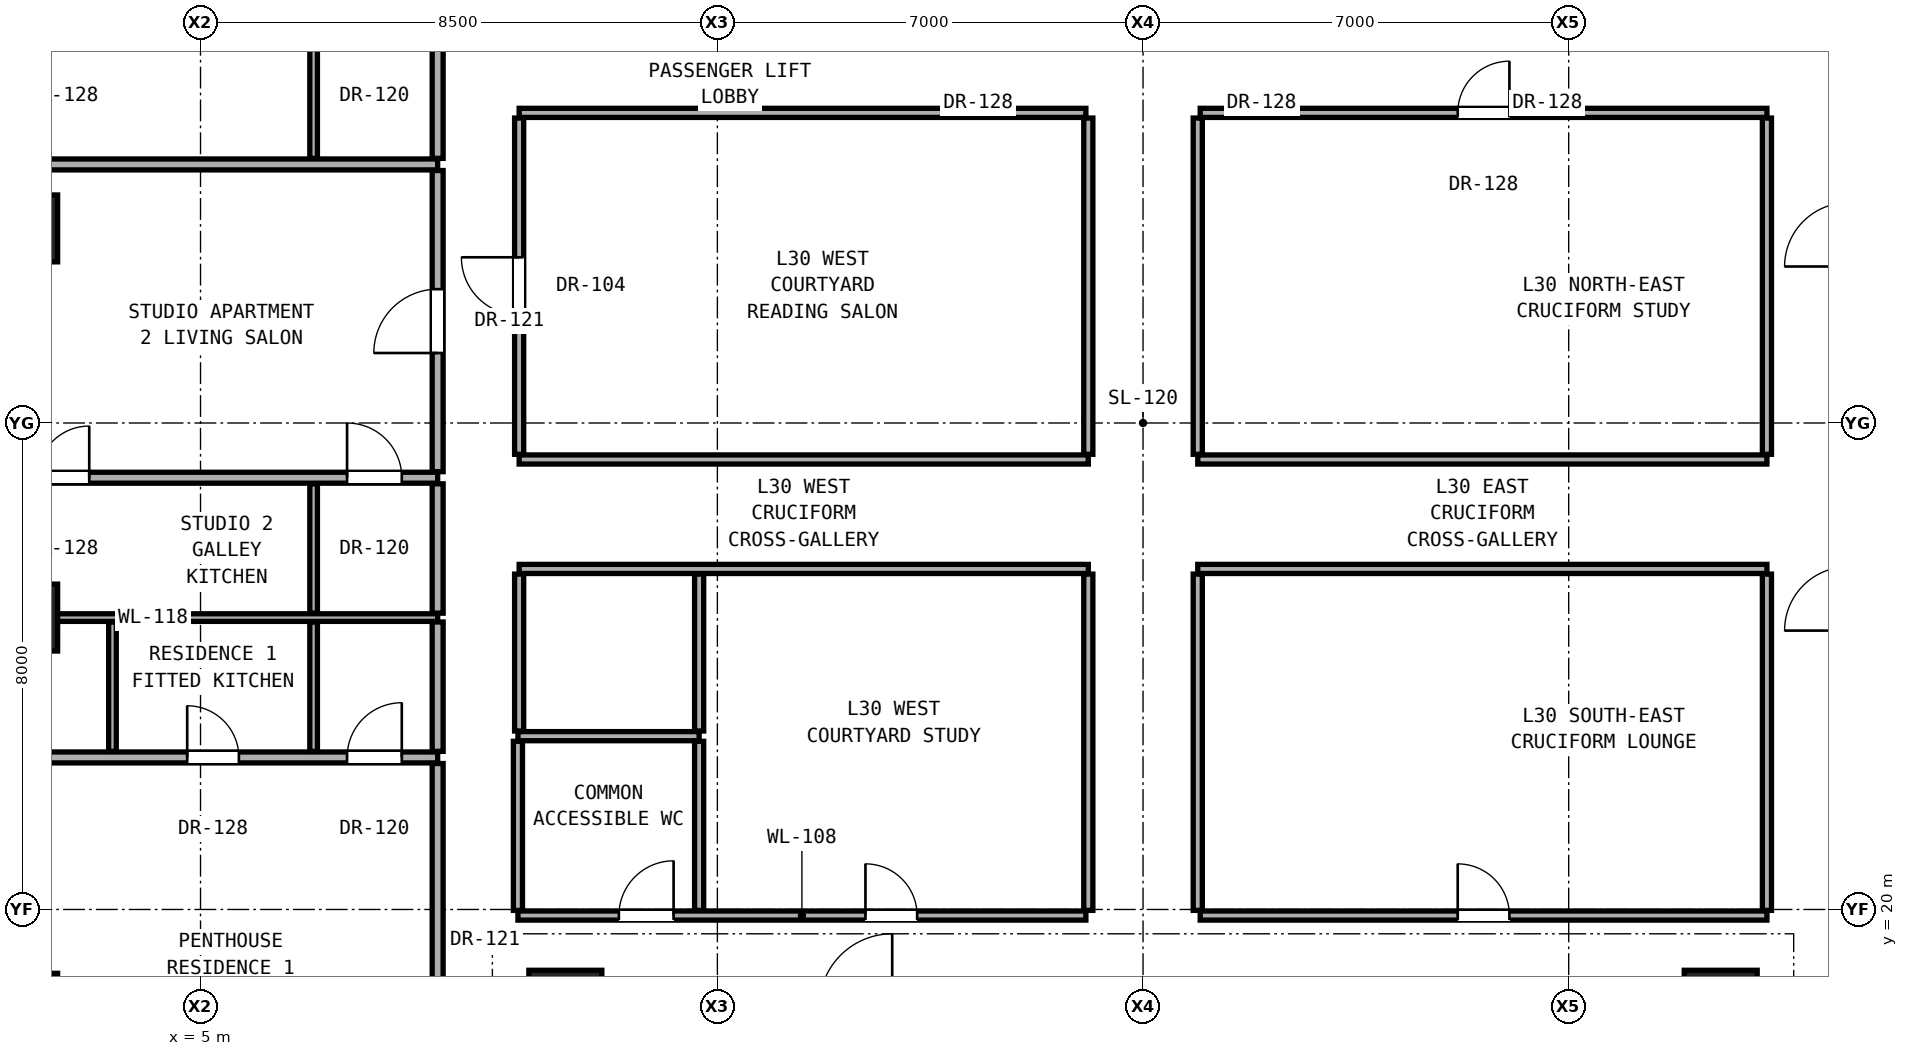
"""IFC4 building model, lengths in metres.
Left out: names, types, materials, properties, quantities, classifications, styles, units other than length and angle.
Written with IfcOpenShell. Run it as: python <this file> out.ifc"""

import sys

from ifc_helpers import new_model, si_unit, direction, frame, frame_2d, origin, origin_2d, place, context, subcontext, project, spatial, rectangle, hollow_rectangle, extrude, element, fill, save


model = new_model("IFC4")
c1 = context("Model", 3, precision=1e-05, world=origin(), true_north=direction((0.0, 1.0)))
c2 = subcontext(c1, "Body", "Model", "MODEL_VIEW")
j1 = project(units=[si_unit("LENGTHUNIT", "METRE"), si_unit("PLANEANGLEUNIT", "RADIAN")], contexts=[c1])
p1 = place(None, origin())
s1 = spatial("IfcSite", under=j1, at=p1, CompositionType="ELEMENT")
p2 = place(p1, origin())
s2 = spatial("IfcBuilding", under=s1, at=p2, CompositionType="ELEMENT")
p3 = place(p2, frame((0.0, 0.0, 108.2)))
s3 = spatial("IfcBuildingStorey", under=s2, at=p3, CompositionType="ELEMENT", Elevation=108.2)
for number, where, z_axis, x_axis in (
    (1, (11.0, 18.4, 0.0), (0.0, 0.0, 1.0), (1.0, 0.0, 0.0)),
    (2, (30.0, 18.4, 0.0), (0.0, 0.0, 1.0), (1.0, 0.0, 0.0)),
):
    element("IfcColumn", number, at=place(p3, frame(where, z_axis=z_axis, x_axis=x_axis)), inside=s3, PredefinedType="COLUMN", context=c2, shape_type="SweptSolid", body=[
        extrude(rectangle(XDim=1.2, YDim=1.2, at=origin_2d()), origin(), (0.0, 0.0, 1.0), 3.3),
    ])
for number, where, z_axis, x_axis in (
    (3, (2.1, 18.4, 0.0), (0.0, 0.0, 1.0), (1.0, 0.0, 0.0)),
    (4, (2.1, 24.8, 0.0), (0.0, 0.0, 1.0), (1.0, 0.0, 0.0)),
    (5, (2.1, 31.2, 0.0), (0.0, 0.0, 1.0), (1.0, 0.0, 0.0)),
):
    element("IfcColumn", number, at=place(p3, frame(where, z_axis=z_axis, x_axis=x_axis)), inside=s3, PredefinedType="COLUMN", context=c2, shape_type="SweptSolid", body=[
        extrude(hollow_rectangle(XDim=1.1, YDim=1.1, WallThickness=0.06, at=origin_2d()), origin(), (0.0, 0.0, 1.0), 3.3),
    ])
p4 = place(p3, frame((10.22, 19.9, 0.0), z_axis=(0.0, 0.0, 1.0), x_axis=(1.0, 0.0, 0.0)))
e6 = element("IfcWall", 6, at=p4, inside=s3, PredefinedType="PARTITIONING", context=c2, shape_type="SweptSolid", body=[
    extrude(rectangle(XDim=9.34, YDim=0.15, at=frame_2d((4.67, 0.0))), origin(), (0.0, 0.0, 1.0), 2.124),
])
p5 = place(p4, frame((1.66, 0.0, 0.0)))
e7 = element("IfcOpeningElement", 7, at=p5, cuts=e6, PredefinedType="OPENING", context=c2, shape_type="SweptSolid", body=[
    extrude(rectangle(XDim=0.9, YDim=2.1, at=frame_2d((0.45, 1.05))), frame((0.0, 0.085, 0.0), z_axis=(0.0, -1.0, 0.0), x_axis=(1.0, 0.0, 0.0)), (0.0, 0.0, 1.0), 0.17),
])
p6 = place(p4, frame((5.715, 0.0, 0.0)))
e8 = element("IfcOpeningElement", 8, at=p6, cuts=e6, PredefinedType="OPENING", context=c2, shape_type="SweptSolid", body=[
    extrude(rectangle(XDim=0.85, YDim=2.01, at=frame_2d((0.425, 1.005))), frame((0.0, 0.085, 0.0), z_axis=(0.0, -1.0, 0.0), x_axis=(1.0, 0.0, 0.0)), (0.0, 0.0, 1.0), 0.17),
])
p7 = place(p3, frame((21.44, 19.9, 0.0), z_axis=(0.0, 0.0, 1.0), x_axis=(1.0, 0.0, 0.0)))
e9 = element("IfcWall", 9, at=p7, inside=s3, PredefinedType="PARTITIONING", context=c2, shape_type="SweptSolid", body=[
    extrude(rectangle(XDim=9.32, YDim=0.15, at=frame_2d((4.66, 0.0))), origin(), (0.0, 0.0, 1.0), 2.124),
])
p8 = place(p7, frame((4.235, 0.0, 0.0)))
e10 = element("IfcOpeningElement", 10, at=p8, cuts=e9, PredefinedType="OPENING", context=c2, shape_type="SweptSolid", body=[
    extrude(rectangle(XDim=0.85, YDim=2.01, at=frame_2d((0.425, 1.005))), frame((0.0, 0.085, 0.0), z_axis=(0.0, -1.0, 0.0), x_axis=(1.0, 0.0, 0.0)), (0.0, 0.0, 1.0), 0.17),
])
p9 = place(p3, frame((-1.41, 22.5, 0.0), z_axis=(0.0, 0.0, 1.0), x_axis=(1.0, 0.0, 0.0)))
e11 = element("IfcWall", 11, at=p9, inside=s3, PredefinedType="PARTITIONING", context=c2, shape_type="SweptSolid", body=[
    extrude(rectangle(XDim=10.31, YDim=0.18, at=frame_2d((5.155, 0.0))), origin(), (0.0, 0.0, 1.0), 2.145),
])
p10 = place(p9, frame((2.076, 0.0, 0.0)))
e12 = element("IfcOpeningElement", 12, at=p10, cuts=e11, PredefinedType="OPENING", context=c2, shape_type="SweptSolid", body=[
    extrude(rectangle(XDim=0.85, YDim=2.01, at=frame_2d((0.425, 1.005))), frame((0.0, 0.1, 0.0), z_axis=(0.0, -1.0, 0.0), x_axis=(1.0, 0.0, 0.0)), (0.0, 0.0, 1.0), 0.2),
])
p11 = place(p9, frame((6.191, 0.0, 0.0)))
e13 = element("IfcOpeningElement", 13, at=p11, cuts=e11, PredefinedType="OPENING", context=c2, shape_type="SweptSolid", body=[
    extrude(rectangle(XDim=0.85, YDim=2.01, at=frame_2d((0.425, 1.005))), frame((0.0, 0.1, 0.0), z_axis=(0.0, -1.0, 0.0), x_axis=(1.0, 0.0, 0.0)), (0.0, 0.0, 1.0), 0.2),
])
p12 = place(p9, frame((8.82, 0.0, 0.0)))
e14 = element("IfcOpeningElement", 14, at=p12, cuts=e11, PredefinedType="OPENING", context=c2, shape_type="SweptSolid", body=[
    extrude(rectangle(XDim=0.9, YDim=2.1, at=frame_2d((0.45, 1.05))), frame((0.0, 0.1, 0.0), z_axis=(0.0, -1.0, 0.0), x_axis=(1.0, 0.0, 0.0)), (0.0, 0.0, 1.0), 0.2),
])
p13 = place(p3, frame((10.22, 22.85, 0.0), z_axis=(0.0, 0.0, 1.0), x_axis=(1.0, 0.0, 0.0)))
e15 = element("IfcWall", 15, at=p13, inside=s3, PredefinedType="PARTITIONING", context=c2, shape_type="SweptSolid", body=[
    extrude(rectangle(XDim=2.98, YDim=0.15, at=frame_2d((1.49, 0.0))), origin(), (0.0, 0.0, 1.0), 2.124),
])
p14 = place(p3, frame((-1.41, 24.8, 0.0), z_axis=(0.0, 0.0, 1.0), x_axis=(1.0, 0.0, 0.0)))
e16 = element("IfcWall", 16, at=p14, inside=s3, PredefinedType="PARTITIONING", context=c2, shape_type="SweptSolid", body=[
    extrude(rectangle(XDim=10.31, YDim=0.125, at=frame_2d((5.155, 0.0))), origin(), (0.0, 0.0, 1.0), 2.145),
])
for number, where, z_axis, x_axis in (
    (17, (10.24, 25.6, 0.0), (0.0, 0.0, 1.0), (1.0, 0.0, 0.0)),
    (18, (21.4, 25.6, 0.0), (0.0, 0.0, 1.0), (1.0, 0.0, 0.0)),
):
    element("IfcWall", number, at=place(p3, frame(where, z_axis=z_axis, x_axis=x_axis)), inside=s3, PredefinedType="PARTITIONING", context=c2, shape_type="SweptSolid", body=[
        extrude(rectangle(XDim=9.36, YDim=0.15, at=frame_2d((4.68, 0.0))), origin(), (0.0, 0.0, 1.0), 2.124),
    ])
p15 = place(p3, frame((-1.41, 27.1, 0.0), z_axis=(0.0, 0.0, 1.0), x_axis=(1.0, 0.0, 0.0)))
e19 = element("IfcWall", 19, at=p15, inside=s3, PredefinedType="PARTITIONING", context=c2, shape_type="SweptSolid", body=[
    extrude(rectangle(XDim=10.31, YDim=0.18, at=frame_2d((5.155, 0.0))), origin(), (0.0, 0.0, 1.0), 2.145),
])
p16 = place(p15, frame((3.73, 0.0, 0.0)))
e20 = element("IfcOpeningElement", 20, at=p16, cuts=e19, PredefinedType="OPENING", context=c2, shape_type="SweptSolid", body=[
    extrude(rectangle(XDim=0.85, YDim=2.01, at=frame_2d((0.425, 1.005))), frame((0.0, 0.1, 0.0), z_axis=(0.0, -1.0, 0.0), x_axis=(1.0, 0.0, 0.0)), (0.0, 0.0, 1.0), 0.2),
])
p17 = place(p15, frame((8.82, 0.0, 0.0)))
e21 = element("IfcOpeningElement", 21, at=p17, cuts=e19, PredefinedType="OPENING", context=c2, shape_type="SweptSolid", body=[
    extrude(rectangle(XDim=0.9, YDim=2.1, at=frame_2d((0.45, 1.05))), frame((0.0, 0.1, 0.0), z_axis=(0.0, -1.0, 0.0), x_axis=(1.0, 0.0, 0.0)), (0.0, 0.0, 1.0), 0.2),
])
for number, where, z_axis, x_axis in (
    (22, (10.24, 27.4, 0.0), (0.0, 0.0, 1.0), (1.0, 0.0, 0.0)),
    (23, (21.4, 27.4, 0.0), (0.0, 0.0, 1.0), (1.0, 0.0, 0.0)),
):
    element("IfcWall", number, at=place(p3, frame(where, z_axis=z_axis, x_axis=x_axis)), inside=s3, PredefinedType="PARTITIONING", context=c2, shape_type="SweptSolid", body=[
        extrude(rectangle(XDim=9.36, YDim=0.15, at=frame_2d((4.68, 0.0))), origin(), (0.0, 0.0, 1.0), 2.124),
    ])
p18 = place(p3, frame((-1.41, 32.252, 0.0), z_axis=(0.0, 0.0, 1.0), x_axis=(1.0, 0.0, 0.0)))
e24 = element("IfcWall", 24, at=p18, inside=s3, PredefinedType="PARTITIONING", context=c2, shape_type="SweptSolid", body=[
    extrude(rectangle(XDim=10.31, YDim=0.18, at=frame_2d((5.155, 0.0))), origin(), (0.0, 0.0, 1.0), 2.145),
])
p19 = place(p3, frame((10.24, 33.1, 0.0), z_axis=(0.0, 0.0, 1.0), x_axis=(1.0, 0.0, 0.0)))
e25 = element("IfcWall", 25, at=p19, inside=s3, PredefinedType="PARTITIONING", context=c2, shape_type="SweptSolid", body=[
    extrude(rectangle(XDim=9.32, YDim=0.15, at=frame_2d((4.66, 0.0))), origin(), (0.0, 0.0, 1.0), 2.124),
])
p20 = place(p3, frame((21.44, 33.1, 0.0), z_axis=(0.0, 0.0, 1.0), x_axis=(1.0, 0.0, 0.0)))
e26 = element("IfcWall", 26, at=p20, inside=s3, PredefinedType="PARTITIONING", context=c2, shape_type="SweptSolid", body=[
    extrude(rectangle(XDim=9.32, YDim=0.15, at=frame_2d((4.66, 0.0))), origin(), (0.0, 0.0, 1.0), 2.124),
])
p21 = place(p20, frame((4.235, 0.0, 0.0)))
e27 = element("IfcOpeningElement", 27, at=p21, cuts=e26, PredefinedType="OPENING", context=c2, shape_type="SweptSolid", body=[
    extrude(rectangle(XDim=0.85, YDim=2.01, at=frame_2d((0.425, 1.005))), frame((0.0, 0.085, 0.0), z_axis=(0.0, -1.0, 0.0), x_axis=(1.0, 0.0, 0.0)), (0.0, 0.0, 1.0), 0.17),
])
for number, where, z_axis, x_axis in (
    (28, (3.552, 22.6, 0.0), (0.0, 0.0, 1.0), (0.0, 1.0, 0.0)),
    (29, (6.86, 22.6, 0.0), (0.0, 0.0, 1.0), (0.0, 1.0, 0.0)),
    (30, (6.86, 24.873, 0.0), (0.0, 0.0, 1.0), (0.0, 1.0, 0.0)),
):
    element("IfcWall", number, at=place(p3, frame(where, z_axis=z_axis, x_axis=x_axis)), inside=s3, PredefinedType="PARTITIONING", context=c2, shape_type="SweptSolid", body=[
        extrude(rectangle(XDim=2.127, YDim=0.125, at=frame_2d((1.064, 0.0))), origin(), (0.0, 0.0, 1.0), 2.299),
    ])
p22 = place(p3, frame((6.86, 32.352, 0.0), z_axis=(0.0, 0.0, 1.0), x_axis=(0.0, 1.0, 0.0)))
e31 = element("IfcWall", 31, at=p22, inside=s3, PredefinedType="PARTITIONING", context=c2, shape_type="SweptSolid", body=[
    extrude(rectangle(XDim=2.1, YDim=0.125, at=frame_2d((1.05, 0.0))), origin(), (0.0, 0.0, 1.0), 3.08),
])
p23 = place(p3, frame((8.9, 14.287, 0.0), z_axis=(0.0, 0.0, 1.0), x_axis=(0.0, 1.0, 0.0)))
e32 = element("IfcWall", 32, at=p23, inside=s3, PredefinedType="PARTITIONING", context=c2, shape_type="SweptSolid", body=[
    extrude(rectangle(XDim=8.113, YDim=0.18, at=frame_2d((4.056, 0.0))), origin(), (0.0, 0.0, 1.0), 2.456),
])
p24 = place(p23, frame((3.531, 0.0, 0.0)))
e33 = element("IfcOpeningElement", 33, at=p24, cuts=e32, PredefinedType="OPENING", context=c2, shape_type="SweptSolid", body=[
    extrude(rectangle(XDim=1.05, YDim=2.2, at=frame_2d((0.525, 1.1))), frame((0.0, 0.1, 0.0), z_axis=(0.0, -1.0, 0.0), x_axis=(1.0, 0.0, 0.0)), (0.0, 0.0, 1.0), 0.2),
])
for number, where, z_axis, x_axis in (
    (34, (8.9, 22.6, 0.0), (0.0, 0.0, 1.0), (0.0, 1.0, 0.0)),
    (35, (8.9, 24.873, 0.0), (0.0, 0.0, 1.0), (0.0, 1.0, 0.0)),
):
    element("IfcWall", number, at=place(p3, frame(where, z_axis=z_axis, x_axis=x_axis)), inside=s3, PredefinedType="PARTITIONING", context=c2, shape_type="SweptSolid", body=[
        extrude(rectangle(XDim=2.127, YDim=0.18, at=frame_2d((1.064, 0.0))), origin(), (0.0, 0.0, 1.0), 2.299),
    ])
p25 = place(p3, frame((8.9, 27.2, 0.0), z_axis=(0.0, 0.0, 1.0), x_axis=(0.0, 1.0, 0.0)))
e36 = element("IfcWall", 36, at=p25, inside=s3, PredefinedType="PARTITIONING", context=c2, shape_type="SweptSolid", body=[
    extrude(rectangle(XDim=4.952, YDim=0.18, at=frame_2d((2.476, 0.0))), origin(), (0.0, 0.0, 1.0), 2.299),
])
p26 = place(p25, frame((1.951, 0.0, 0.0)))
e37 = element("IfcOpeningElement", 37, at=p26, cuts=e36, PredefinedType="OPENING", context=c2, shape_type="SweptSolid", body=[
    extrude(rectangle(XDim=1.05, YDim=2.2, at=frame_2d((0.525, 1.1))), frame((0.0, 0.1, 0.0), z_axis=(0.0, -1.0, 0.0), x_axis=(1.0, 0.0, 0.0)), (0.0, 0.0, 1.0), 0.2),
])
p27 = place(p3, frame((8.9, 32.352, 0.0), z_axis=(0.0, 0.0, 1.0), x_axis=(0.0, 1.0, 0.0)))
e38 = element("IfcWall", 38, at=p27, inside=s3, PredefinedType="PARTITIONING", context=c2, shape_type="SweptSolid", body=[
    extrude(rectangle(XDim=2.1, YDim=0.18, at=frame_2d((1.05, 0.0))), origin(), (0.0, 0.0, 1.0), 3.08),
])
p28 = place(p3, frame((10.22, 19.985, 0.0), z_axis=(0.0, 0.0, 1.0), x_axis=(0.0, 1.0, 0.0)))
e39 = element("IfcWall", 39, at=p28, inside=s3, PredefinedType="PARTITIONING", context=c2, shape_type="SweptSolid", body=[
    extrude(rectangle(XDim=2.78, YDim=0.15, at=frame_2d((1.39, 0.0))), origin(), (0.0, 0.0, 1.0), 3.08),
])
p29 = place(p3, frame((10.24, 22.935, 0.0), z_axis=(0.0, 0.0, 1.0), x_axis=(0.0, 1.0, 0.0)))
e40 = element("IfcWall", 40, at=p29, inside=s3, PredefinedType="PARTITIONING", context=c2, shape_type="SweptSolid", body=[
    extrude(rectangle(XDim=2.58, YDim=0.15, at=frame_2d((1.29, 0.0))), origin(), (0.0, 0.0, 1.0), 2.299),
])
p30 = place(p3, frame((10.24, 27.485, 0.0), z_axis=(0.0, 0.0, 1.0), x_axis=(0.0, 1.0, 0.0)))
e41 = element("IfcWall", 41, at=p30, inside=s3, PredefinedType="PARTITIONING", context=c2, shape_type="SweptSolid", body=[
    extrude(rectangle(XDim=5.53, YDim=0.15, at=frame_2d((2.765, 0.0))), origin(), (0.0, 0.0, 1.0), 2.299),
])
p31 = place(p30, frame((2.29, 0.0, 0.0)))
e42 = element("IfcOpeningElement", 42, at=p31, cuts=e41, PredefinedType="OPENING", context=c2, shape_type="SweptSolid", body=[
    extrude(rectangle(XDim=0.95, YDim=2.15, at=frame_2d((0.475, 1.075))), frame((0.0, 0.085, 0.0), z_axis=(0.0, -1.0, 0.0), x_axis=(1.0, 0.0, 0.0)), (0.0, 0.0, 1.0), 0.17),
])
p32 = place(p3, frame((13.2, 19.985, 0.0), z_axis=(0.0, 0.0, 1.0), x_axis=(0.0, 1.0, 0.0)))
e43 = element("IfcWall", 43, at=p32, inside=s3, PredefinedType="PARTITIONING", context=c2, shape_type="SweptSolid", body=[
    extrude(rectangle(XDim=2.78, YDim=0.15, at=frame_2d((1.39, 0.0))), origin(), (0.0, 0.0, 1.0), 3.08),
])
p33 = place(p3, frame((13.2, 22.935, 0.0), z_axis=(0.0, 0.0, 1.0), x_axis=(0.0, 1.0, 0.0)))
e44 = element("IfcWall", 44, at=p33, inside=s3, PredefinedType="PARTITIONING", context=c2, shape_type="SweptSolid", body=[
    extrude(rectangle(XDim=2.58, YDim=0.15, at=frame_2d((1.29, 0.0))), origin(), (0.0, 0.0, 1.0), 2.124),
])
for number, where, z_axis, x_axis in (
    (45, (19.6, 19.985, 0.0), (0.0, 0.0, 1.0), (0.0, 1.0, 0.0)),
    (46, (19.6, 27.485, 0.0), (0.0, 0.0, 1.0), (0.0, 1.0, 0.0)),
    (47, (21.4, 19.985, 0.0), (0.0, 0.0, 1.0), (0.0, 1.0, 0.0)),
    (48, (21.4, 27.485, 0.0), (0.0, 0.0, 1.0), (0.0, 1.0, 0.0)),
):
    element("IfcWall", number, at=place(p3, frame(where, z_axis=z_axis, x_axis=x_axis)), inside=s3, PredefinedType="PARTITIONING", context=c2, shape_type="SweptSolid", body=[
        extrude(rectangle(XDim=5.53, YDim=0.15, at=frame_2d((2.765, 0.0))), origin(), (0.0, 0.0, 1.0), 2.124),
    ])
for number, where, z_axis, x_axis in (
    (49, (30.76, 19.985, 0.0), (0.0, 0.0, 1.0), (0.0, 1.0, 0.0)),
    (50, (30.76, 27.485, 0.0), (0.0, 0.0, 1.0), (0.0, 1.0, 0.0)),
):
    element("IfcWall", number, at=place(p3, frame(where, z_axis=z_axis, x_axis=x_axis)), inside=s3, PredefinedType="PARTITIONING", context=c2, shape_type="SweptSolid", body=[
        extrude(rectangle(XDim=5.53, YDim=0.15, at=frame_2d((2.765, 0.0))), origin(), (0.0, 0.0, 1.0), 2.299),
    ])
p34 = place(p5, origin())
e51 = element("IfcDoor", 51, at=p34, inside=s3, OperationType="SINGLE_SWING_RIGHT", PredefinedType="DOOR", context=c2, shape_type="SweptSolid", body=[
    extrude(rectangle(XDim=0.9, YDim=2.1, at=frame_2d((0.45, 1.05))), frame((0.0, 0.025, 0.0), z_axis=(0.0, -1.0, 0.0), x_axis=(1.0, 0.0, 0.0)), (0.0, 0.0, 1.0), 0.05),
])
fill(e7, e51)
p35 = place(p11, origin())
e52 = element("IfcDoor", 52, at=p35, inside=s3, OperationType="SINGLE_SWING_LEFT", PredefinedType="DOOR", context=c2, shape_type="SweptSolid", body=[
    extrude(rectangle(XDim=0.85, YDim=2.01, at=frame_2d((0.425, 1.005))), frame((0.0, 0.025, 0.0), z_axis=(0.0, -1.0, 0.0), x_axis=(1.0, 0.0, 0.0)), (0.0, 0.0, 1.0), 0.05),
])
fill(e13, e52)
p36 = place(p12, origin())
e53 = element("IfcDoor", 53, at=p36, inside=s3, OperationType="SINGLE_SWING_RIGHT", PredefinedType="DOOR", context=c2, shape_type="SweptSolid", body=[
    extrude(rectangle(XDim=0.9, YDim=2.1, at=frame_2d((0.45, 1.05))), frame((0.0, 0.025, 0.0), z_axis=(0.0, -1.0, 0.0), x_axis=(1.0, 0.0, 0.0)), (0.0, 0.0, 1.0), 0.05),
])
fill(e14, e53)
p37 = place(p26, origin())
e54 = element("IfcDoor", 54, at=p37, inside=s3, OperationType="SINGLE_SWING_LEFT", PredefinedType="DOOR", context=c2, shape_type="SweptSolid", body=[
    extrude(rectangle(XDim=1.05, YDim=2.2, at=frame_2d((0.525, 1.1))), frame((0.0, 0.025, 0.0), z_axis=(0.0, -1.0, 0.0), x_axis=(1.0, 0.0, 0.0)), (0.0, 0.0, 1.0), 0.05),
])
fill(e37, e54)
p38 = place(p16, origin())
e55 = element("IfcDoor", 55, at=p38, inside=s3, OperationType="SINGLE_SWING_RIGHT", PredefinedType="DOOR", context=c2, shape_type="SweptSolid", body=[
    extrude(rectangle(XDim=0.85, YDim=2.01, at=frame_2d((0.425, 1.005))), frame((0.0, 0.025, 0.0), z_axis=(0.0, -1.0, 0.0), x_axis=(1.0, 0.0, 0.0)), (0.0, 0.0, 1.0), 0.05),
])
fill(e20, e55)
p39 = place(p17, origin())
e56 = element("IfcDoor", 56, at=p39, inside=s3, OperationType="SINGLE_SWING_LEFT", PredefinedType="DOOR", context=c2, shape_type="SweptSolid", body=[
    extrude(rectangle(XDim=0.9, YDim=2.1, at=frame_2d((0.45, 1.05))), frame((0.0, 0.025, 0.0), z_axis=(0.0, -1.0, 0.0), x_axis=(1.0, 0.0, 0.0)), (0.0, 0.0, 1.0), 0.05),
])
fill(e21, e56)
p40 = place(p6, origin())
e57 = element("IfcDoor", 57, at=p40, inside=s3, OperationType="SINGLE_SWING_LEFT", PredefinedType="DOOR", context=c2, shape_type="SweptSolid", body=[
    extrude(rectangle(XDim=0.85, YDim=2.01, at=frame_2d((0.425, 1.005))), frame((0.0, 0.025, 0.0), z_axis=(0.0, -1.0, 0.0), x_axis=(1.0, 0.0, 0.0)), (0.0, 0.0, 1.0), 0.05),
])
fill(e8, e57)
p41 = place(p31, origin())
e58 = element("IfcDoor", 58, at=p41, inside=s3, OperationType="SINGLE_SWING_RIGHT", PredefinedType="DOOR", context=c2, shape_type="SweptSolid", body=[
    extrude(rectangle(XDim=0.95, YDim=2.15, at=frame_2d((0.475, 1.075))), frame((0.0, 0.025, 0.0), z_axis=(0.0, -1.0, 0.0), x_axis=(1.0, 0.0, 0.0)), (0.0, 0.0, 1.0), 0.05),
])
fill(e42, e58)
p42 = place(p8, origin())
e59 = element("IfcDoor", 59, at=p42, inside=s3, OperationType="SINGLE_SWING_LEFT", PredefinedType="DOOR", context=c2, shape_type="SweptSolid", body=[
    extrude(rectangle(XDim=0.85, YDim=2.01, at=frame_2d((0.425, 1.005))), frame((0.0, 0.025, 0.0), z_axis=(0.0, -1.0, 0.0), x_axis=(1.0, 0.0, 0.0)), (0.0, 0.0, 1.0), 0.05),
])
fill(e10, e59)
p43 = place(p21, origin())
e60 = element("IfcDoor", 60, at=p43, inside=s3, OperationType="SINGLE_SWING_RIGHT", PredefinedType="DOOR", context=c2, shape_type="SweptSolid", body=[
    extrude(rectangle(XDim=0.85, YDim=2.01, at=frame_2d((0.425, 1.005))), frame((0.0, 0.025, 0.0), z_axis=(0.0, -1.0, 0.0), x_axis=(1.0, 0.0, 0.0)), (0.0, 0.0, 1.0), 0.05),
])
fill(e27, e60)
save(model, sys.argv[1])
